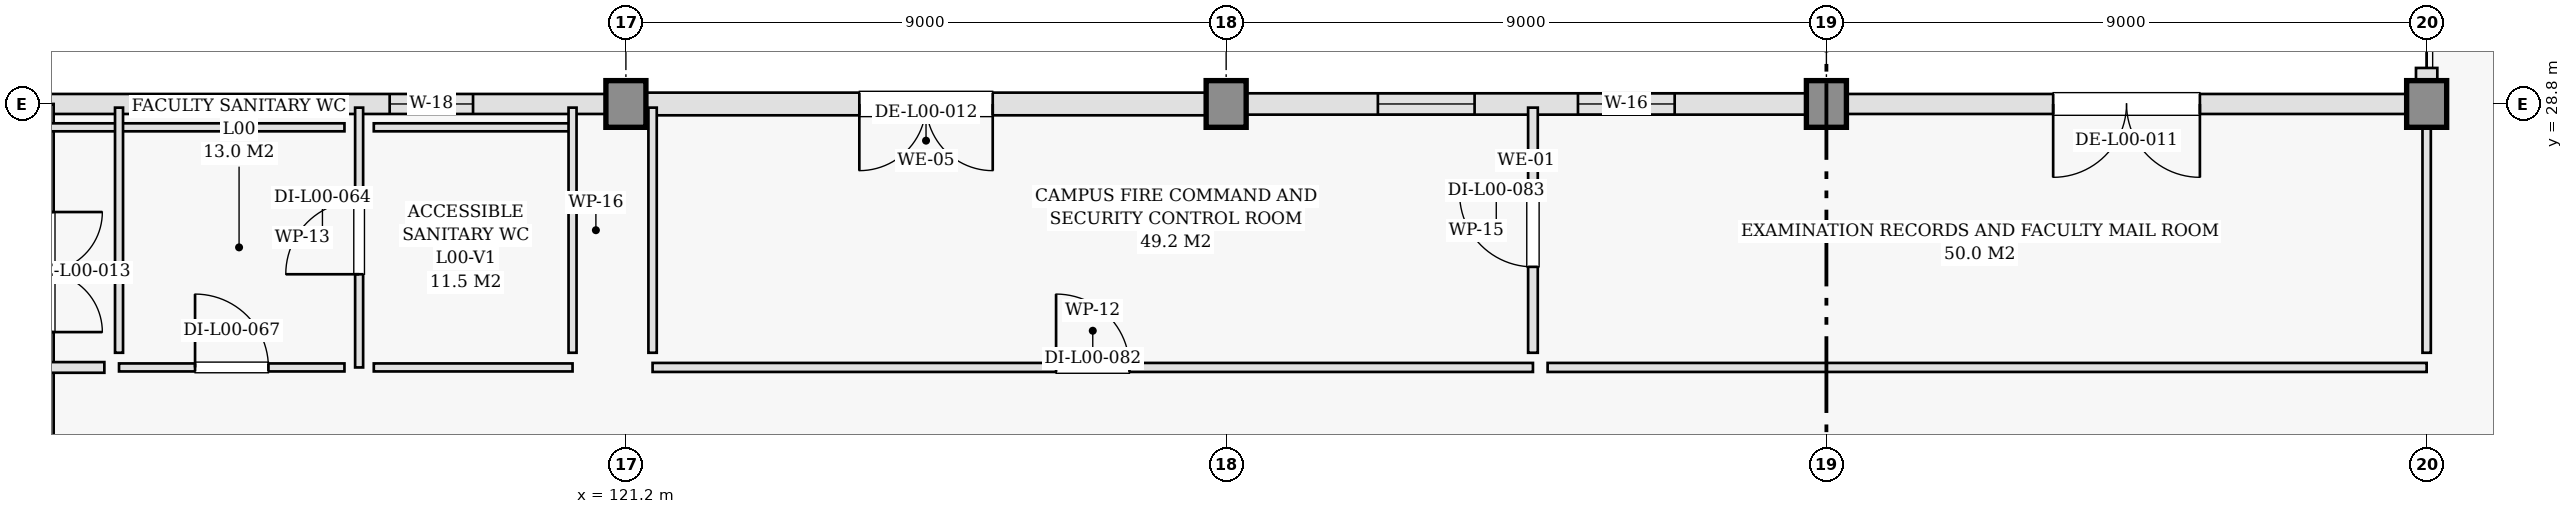
"""IFC4 building model, lengths in metres.
Left out: names, types, materials, properties, quantities, classifications, styles, units other than length and angle.
Written with IfcOpenShell. Run it as: python <this file> out.ifc"""

import sys

from ifc_helpers import new_model, si_unit, direction, frame, frame_2d, origin, origin_2d, place, context, subcontext, project, spatial, rectangle, extrude, element, fill, save


model = new_model("IFC4")
c1 = context("Model", 3, precision=1e-05, world=origin(), true_north=direction((0.0, 1.0)))
c2 = subcontext(c1, "Body", "Model", "MODEL_VIEW")
j1 = project(units=[si_unit("LENGTHUNIT", "METRE"), si_unit("PLANEANGLEUNIT", "RADIAN")], contexts=[c1])
p1 = place(None, origin())
s1 = spatial("IfcSite", under=j1, at=p1, CompositionType="ELEMENT")
p2 = place(p1, origin())
s2 = spatial("IfcBuilding", under=s1, at=p2, CompositionType="ELEMENT")
p3 = place(p2, origin())
s3 = spatial("IfcBuildingStorey", under=s2, at=p3, CompositionType="ELEMENT", Elevation=0.0)
for number, where, z_axis, x_axis in (
    (1, (121.2, 28.8, 0.0), (0.0, 0.0, 1.0), (1.0, 0.0, 0.0)),
    (2, (130.2, 28.8, 0.0), (0.0, 0.0, 1.0), (1.0, 0.0, 0.0)),
    (3, (139.2, 28.8, 0.0), (0.0, 0.0, 1.0), (1.0, 0.0, 0.0)),
    (4, (148.2, 28.8, 0.0), (0.0, 0.0, 1.0), (1.0, 0.0, 0.0)),
):
    element("IfcColumn", number, at=place(p3, frame(where, z_axis=z_axis, x_axis=x_axis)), inside=s3, PredefinedType="COLUMN", context=c2, shape_type="SweptSolid", body=[
        extrude(rectangle(XDim=0.7, YDim=0.7, at=origin_2d()), origin(), (0.0, 0.0, 1.0), 4.8),
    ])
p4 = place(p3, frame((148.2, 29.34, 0.0), z_axis=(0.0, 0.0, 1.0), x_axis=(0.0, -1.0, 0.0)))
e5 = element("IfcWall", 5, at=p4, inside=s3, PredefinedType="SOLIDWALL", context=c2, shape_type="SweptSolid", body=[
    extrude(rectangle(XDim=0.388, YDim=0.32, at=frame_2d((0.194, 0.0))), origin(), (0.0, 0.0, 1.0), 3.705),
])
p5 = place(p3, frame((148.2, 28.8, 0.0), z_axis=(0.0, 0.0, 1.0), x_axis=(-1.0, 0.0, 0.0)))
e6 = element("IfcWall", 6, at=p5, inside=s3, PredefinedType="SOLIDWALL", context=c2, shape_type="SweptSolid", body=[
    extrude(rectangle(XDim=9.0, YDim=0.3, at=frame_2d((4.5, 0.0))), origin(), (0.0, 0.0, 1.0), 3.705),
])
p6 = place(p5, frame((3.4, 0.0, 0.0)))
e7 = element("IfcOpeningElement", 7, at=p6, cuts=e6, PredefinedType="OPENING", context=c2, shape_type="SweptSolid", body=[
    extrude(rectangle(XDim=2.2, YDim=2.35, at=frame_2d((1.1, 1.175))), frame((0.0, 0.16, 0.0), z_axis=(0.0, -1.0, 0.0), x_axis=(1.0, 0.0, 0.0)), (0.0, 0.0, 1.0), 0.32),
])
p7 = place(p3, frame((139.2, 28.8, 0.0), z_axis=(0.0, 0.0, 1.0), x_axis=(-1.0, 0.0, 0.0)))
e8 = element("IfcWall", 8, at=p7, inside=s3, PredefinedType="SOLIDWALL", context=c2, shape_type="SweptSolid", body=[
    extrude(rectangle(XDim=9.0, YDim=0.32, at=frame_2d((4.5, 0.0))), origin(), (0.0, 0.0, 1.0), 3.705),
])
p8 = place(p7, frame((2.275, 0.0, 0.9)))
e9 = element("IfcOpeningElement", 9, at=p8, cuts=e8, PredefinedType="OPENING", context=c2, shape_type="SweptSolid", body=[
    extrude(rectangle(XDim=1.45, YDim=1.6, at=frame_2d((0.725, 0.8))), frame((0.0, 0.17, 0.0), z_axis=(0.0, -1.0, 0.0), x_axis=(1.0, 0.0, 0.0)), (0.0, 0.0, 1.0), 0.34),
])
p9 = place(p7, frame((5.275, 0.0, 0.9)))
e10 = element("IfcOpeningElement", 10, at=p9, cuts=e8, PredefinedType="OPENING", context=c2, shape_type="SweptSolid", body=[
    extrude(rectangle(XDim=1.45, YDim=1.6, at=frame_2d((0.725, 0.8))), frame((0.0, 0.17, 0.0), z_axis=(0.0, -1.0, 0.0), x_axis=(1.0, 0.0, 0.0)), (0.0, 0.0, 1.0), 0.34),
])
p10 = place(p3, frame((130.2, 28.8, 0.0), z_axis=(0.0, 0.0, 1.0), x_axis=(-1.0, 0.0, 0.0)))
e11 = element("IfcWall", 11, at=p10, inside=s3, PredefinedType="SOLIDWALL", context=c2, shape_type="SweptSolid", body=[
    extrude(rectangle(XDim=9.0, YDim=0.34, at=frame_2d((4.5, 0.0))), origin(), (0.0, 0.0, 1.0), 3.705),
])
p11 = place(p10, frame((3.5, 0.0, 0.0)))
e12 = element("IfcOpeningElement", 12, at=p11, cuts=e11, PredefinedType="OPENING", context=c2, shape_type="SweptSolid", body=[
    extrude(rectangle(XDim=2.0, YDim=2.3, at=frame_2d((1.0, 1.15))), frame((0.0, 0.18, 0.0), z_axis=(0.0, -1.0, 0.0), x_axis=(1.0, 0.0, 0.0)), (0.0, 0.0, 1.0), 0.36),
])
p12 = place(p3, frame((121.2, 28.8, 0.0), z_axis=(0.0, 0.0, 1.0), x_axis=(-1.0, 0.0, 0.0)))
e13 = element("IfcWall", 13, at=p12, inside=s3, PredefinedType="SOLIDWALL", context=c2, shape_type="SweptSolid", body=[
    extrude(rectangle(XDim=8.75, YDim=0.3, at=frame_2d((4.375, 0.0))), origin(), (0.0, 0.0, 1.0), 3.705),
])
p13 = place(p12, frame((2.292, 0.0, 0.9)))
e14 = element("IfcOpeningElement", 14, at=p13, cuts=e13, PredefinedType="OPENING", context=c2, shape_type="SweptSolid", body=[
    extrude(rectangle(XDim=1.25, YDim=1.5, at=frame_2d((0.625, 0.75))), frame((0.0, 0.16, 0.0), z_axis=(0.0, -1.0, 0.0), x_axis=(1.0, 0.0, 0.0)), (0.0, 0.0, 1.0), 0.32),
])
p14 = place(p12, frame((5.208, 0.0, 0.9)))
e15 = element("IfcOpeningElement", 15, at=p14, cuts=e13, PredefinedType="OPENING", context=c2, shape_type="SweptSolid", body=[
    extrude(rectangle(XDim=1.25, YDim=1.5, at=frame_2d((0.625, 0.75))), frame((0.0, 0.16, 0.0), z_axis=(0.0, -1.0, 0.0), x_axis=(1.0, 0.0, 0.0)), (0.0, 0.0, 1.0), 0.32),
])
p15 = place(p3, frame((112.45, 28.8, 0.0), z_axis=(0.0, 0.0, 1.0), x_axis=(0.0, -1.0, 0.0)))
e16 = element("IfcWall", 16, at=p15, inside=s3, PredefinedType="SOLIDWALL", context=c2, shape_type="SweptSolid", body=[
    extrude(rectangle(XDim=7.2, YDim=0.34, at=frame_2d((3.6, 0.0))), origin(), (0.0, 0.0, 1.0), 3.705),
])
p16 = place(p15, frame((1.62, 0.0, 0.0)))
e17 = element("IfcOpeningElement", 17, at=p16, cuts=e16, PredefinedType="OPENING", context=c2, shape_type="SweptSolid", body=[
    extrude(rectangle(XDim=1.8, YDim=2.2, at=frame_2d((0.9, 1.1))), frame((0.0, 0.18, 0.0), z_axis=(0.0, -1.0, 0.0), x_axis=(1.0, 0.0, 0.0)), (0.0, 0.0, 1.0), 0.36),
])
p17 = place(p3, frame((117.2, 24.85, 0.0), z_axis=(0.0, 0.0, 1.0), x_axis=(0.0, 1.0, 0.0)))
e18 = element("IfcWall", 18, at=p17, inside=s3, PredefinedType="PARTITIONING", context=c2, shape_type="SweptSolid", body=[
    extrude(rectangle(XDim=3.895, YDim=0.12, at=frame_2d((1.948, 0.0))), origin(), (0.0, 0.0, 1.0), 3.705),
])
p18 = place(p17, frame((1.397, 0.0, 0.0)))
e19 = element("IfcOpeningElement", 19, at=p18, cuts=e18, PredefinedType="OPENING", context=c2, shape_type="SweptSolid", body=[
    extrude(rectangle(XDim=1.1, YDim=2.15, at=frame_2d((0.55, 1.075))), frame((0.0, 0.07, 0.0), z_axis=(0.0, -1.0, 0.0), x_axis=(1.0, 0.0, 0.0)), (0.0, 0.0, 1.0), 0.14),
])
for number, where, z_axis, x_axis in (
    (20, (117.42, 24.85, 0.0), (0.0, 0.0, 1.0), (1.0, 0.0, 0.0)),
    (21, (117.42, 28.45, 0.0), (0.0, 0.0, 1.0), (1.0, 0.0, 0.0)),
):
    element("IfcWall", number, at=place(p3, frame(where, z_axis=z_axis, x_axis=x_axis)), inside=s3, PredefinedType="PARTITIONING", context=c2, shape_type="SweptSolid", body=[
        extrude(rectangle(XDim=2.98, YDim=0.12, at=frame_2d((1.49, 0.0))), origin(), (0.0, 0.0, 1.0), 4.52),
    ])
p19 = place(p3, frame((120.4, 25.07, 0.0), z_axis=(0.0, 0.0, 1.0), x_axis=(0.0, 1.0, 0.0)))
e22 = element("IfcWall", 22, at=p19, inside=s3, PredefinedType="PARTITIONING", context=c2, shape_type="SweptSolid", body=[
    extrude(rectangle(XDim=3.675, YDim=0.12, at=frame_2d((1.837, 0.0))), origin(), (0.0, 0.0, 1.0), 3.705),
])
p20 = place(p3, frame((112.505, 28.45, 0.0), z_axis=(0.0, 0.0, 1.0), x_axis=(1.0, 0.0, 0.0)))
e23 = element("IfcWall", 23, at=p20, inside=s3, PredefinedType="PARTITIONING", context=c2, shape_type="SweptSolid", body=[
    extrude(rectangle(XDim=4.475, YDim=0.12, at=frame_2d((2.238, 0.0))), origin(), (0.0, 0.0, 1.0), 4.52),
])
p21 = place(p3, frame((113.6, 24.85, 0.0), z_axis=(0.0, 0.0, 1.0), x_axis=(1.0, 0.0, 0.0)))
e24 = element("IfcWall", 24, at=p21, inside=s3, PredefinedType="PARTITIONING", context=c2, shape_type="SweptSolid", body=[
    extrude(rectangle(XDim=3.38, YDim=0.12, at=frame_2d((1.69, 0.0))), origin(), (0.0, 0.0, 1.0), 4.52),
])
p22 = place(p21, frame((1.14, 0.0, 0.0)))
e25 = element("IfcOpeningElement", 25, at=p22, cuts=e24, PredefinedType="OPENING", context=c2, shape_type="SweptSolid", body=[
    extrude(rectangle(XDim=1.1, YDim=2.15, at=frame_2d((0.55, 1.075))), frame((0.0, 0.07, 0.0), z_axis=(0.0, -1.0, 0.0), x_axis=(1.0, 0.0, 0.0)), (0.0, 0.0, 1.0), 0.14),
])
p23 = place(p3, frame((113.6, 25.07, 0.0), z_axis=(0.0, 0.0, 1.0), x_axis=(0.0, 1.0, 0.0)))
e26 = element("IfcWall", 26, at=p23, inside=s3, PredefinedType="PARTITIONING", context=c2, shape_type="SweptSolid", body=[
    extrude(rectangle(XDim=3.675, YDim=0.12, at=frame_2d((1.837, 0.0))), origin(), (0.0, 0.0, 1.0), 3.705),
])
p24 = place(p3, frame((121.6, 24.85, 0.0), z_axis=(0.0, 0.0, 1.0), x_axis=(1.0, 0.0, 0.0)))
e27 = element("IfcWall", 27, at=p24, inside=s3, PredefinedType="PARTITIONING", context=c2, shape_type="SweptSolid", body=[
    extrude(rectangle(XDim=13.2, YDim=0.135, at=frame_2d((6.6, 0.0))), origin(), (0.0, 0.0, 1.0), 4.52),
])
p25 = place(p24, frame((6.05, 0.0, 0.0)))
e28 = element("IfcOpeningElement", 28, at=p25, cuts=e27, PredefinedType="OPENING", context=c2, shape_type="SweptSolid", body=[
    extrude(rectangle(XDim=1.1, YDim=2.15, at=frame_2d((0.55, 1.075))), frame((0.0, 0.078, 0.0), z_axis=(0.0, -1.0, 0.0), x_axis=(1.0, 0.0, 0.0)), (0.0, 0.0, 1.0), 0.155),
])
p26 = place(p3, frame((121.6, 25.07, 0.0), z_axis=(0.0, 0.0, 1.0), x_axis=(0.0, 1.0, 0.0)))
e29 = element("IfcWall", 29, at=p26, inside=s3, PredefinedType="PARTITIONING", context=c2, shape_type="SweptSolid", body=[
    extrude(rectangle(XDim=3.675, YDim=0.125, at=frame_2d((1.837, 0.0))), origin(), (0.0, 0.0, 1.0), 3.705),
])
p27 = place(p3, frame((134.8, 25.07, 0.0), z_axis=(0.0, 0.0, 1.0), x_axis=(0.0, 1.0, 0.0)))
e30 = element("IfcWall", 30, at=p27, inside=s3, PredefinedType="PARTITIONING", context=c2, shape_type="SweptSolid", body=[
    extrude(rectangle(XDim=3.675, YDim=0.145, at=frame_2d((1.837, 0.0))), origin(), (0.0, 0.0, 1.0), 3.705),
])
p28 = place(p27, frame((1.288, 0.0, 0.0)))
e31 = element("IfcOpeningElement", 31, at=p28, cuts=e30, PredefinedType="OPENING", context=c2, shape_type="SweptSolid", body=[
    extrude(rectangle(XDim=1.1, YDim=2.15, at=frame_2d((0.55, 1.075))), frame((0.0, 0.083, 0.0), z_axis=(0.0, -1.0, 0.0), x_axis=(1.0, 0.0, 0.0)), (0.0, 0.0, 1.0), 0.165),
])
p29 = place(p3, frame((135.02, 24.85, 0.0), z_axis=(0.0, 0.0, 1.0), x_axis=(1.0, 0.0, 0.0)))
e32 = element("IfcWall", 32, at=p29, inside=s3, PredefinedType="PARTITIONING", context=c2, shape_type="SweptSolid", body=[
    extrude(rectangle(XDim=13.18, YDim=0.135, at=frame_2d((6.59, 0.0))), origin(), (0.0, 0.0, 1.0), 3.855),
])
p30 = place(p3, frame((148.2, 25.07, 0.0), z_axis=(0.0, 0.0, 1.0), x_axis=(0.0, 1.0, 0.0)))
e33 = element("IfcWall", 33, at=p30, inside=s3, PredefinedType="PARTITIONING", context=c2, shape_type="SweptSolid", body=[
    extrude(rectangle(XDim=3.49, YDim=0.125, at=frame_2d((1.745, 0.0))), origin(), (0.0, 0.0, 1.0), 3.855),
])
p31 = place(p3, frame((112.505, 24.85, 0.0), z_axis=(0.0, 0.0, 1.0), x_axis=(1.0, 0.0, 0.0)))
e34 = element("IfcWall", 34, at=p31, inside=s3, PredefinedType="PARTITIONING", context=c2, shape_type="SweptSolid", body=[
    extrude(rectangle(XDim=0.875, YDim=0.16, at=frame_2d((0.438, 0.0))), origin(), (0.0, 0.0, 1.0), 4.52),
])
p32 = place(p6, origin())
e35 = element("IfcDoor", 35, at=p32, inside=s3, OperationType="DOUBLE_DOOR_SINGLE_SWING", PredefinedType="DOOR", context=c2, shape_type="SweptSolid", body=[
    extrude(rectangle(XDim=2.2, YDim=2.35, at=frame_2d((1.1, 1.175))), frame((0.0, 0.025, 0.0), z_axis=(0.0, -1.0, 0.0), x_axis=(1.0, 0.0, 0.0)), (0.0, 0.0, 1.0), 0.05),
])
fill(e7, e35)
p33 = place(p8, origin())
e36 = element("IfcWindow", 36, at=p33, inside=s3, PartitioningType="DOUBLE_PANEL_VERTICAL", PredefinedType="WINDOW", context=c2, shape_type="SweptSolid", body=[
    extrude(rectangle(XDim=1.45, YDim=1.6, at=frame_2d((0.725, 0.8))), frame((0.0, 0.03, 0.0), z_axis=(0.0, -1.0, 0.0), x_axis=(1.0, 0.0, 0.0)), (0.0, 0.0, 1.0), 0.06),
])
fill(e9, e36)
p34 = place(p9, origin())
e37 = element("IfcWindow", 37, at=p34, inside=s3, PartitioningType="DOUBLE_PANEL_VERTICAL", PredefinedType="WINDOW", context=c2, shape_type="SweptSolid", body=[
    extrude(rectangle(XDim=1.45, YDim=1.6, at=frame_2d((0.725, 0.8))), frame((0.0, 0.03, 0.0), z_axis=(0.0, -1.0, 0.0), x_axis=(1.0, 0.0, 0.0)), (0.0, 0.0, 1.0), 0.06),
])
fill(e10, e37)
p35 = place(p11, origin())
e38 = element("IfcDoor", 38, at=p35, inside=s3, OperationType="DOUBLE_DOOR_SINGLE_SWING", PredefinedType="DOOR", context=c2, shape_type="SweptSolid", body=[
    extrude(rectangle(XDim=2.0, YDim=2.3, at=frame_2d((1.0, 1.15))), frame((0.0, 0.025, 0.0), z_axis=(0.0, -1.0, 0.0), x_axis=(1.0, 0.0, 0.0)), (0.0, 0.0, 1.0), 0.05),
])
fill(e12, e38)
p36 = place(p13, origin())
e39 = element("IfcWindow", 39, at=p36, inside=s3, PartitioningType="DOUBLE_PANEL_VERTICAL", PredefinedType="WINDOW", context=c2, shape_type="SweptSolid", body=[
    extrude(rectangle(XDim=1.25, YDim=1.5, at=frame_2d((0.625, 0.75))), frame((0.0, 0.03, 0.0), z_axis=(0.0, -1.0, 0.0), x_axis=(1.0, 0.0, 0.0)), (0.0, 0.0, 1.0), 0.06),
])
fill(e14, e39)
p37 = place(p14, origin())
e40 = element("IfcWindow", 40, at=p37, inside=s3, PartitioningType="DOUBLE_PANEL_VERTICAL", PredefinedType="WINDOW", context=c2, shape_type="SweptSolid", body=[
    extrude(rectangle(XDim=1.25, YDim=1.5, at=frame_2d((0.625, 0.75))), frame((0.0, 0.03, 0.0), z_axis=(0.0, -1.0, 0.0), x_axis=(1.0, 0.0, 0.0)), (0.0, 0.0, 1.0), 0.06),
])
fill(e15, e40)
p38 = place(p18, origin())
e41 = element("IfcDoor", 41, at=p38, inside=s3, OperationType="SINGLE_SWING_LEFT", PredefinedType="DOOR", context=c2, shape_type="SweptSolid", body=[
    extrude(rectangle(XDim=1.1, YDim=2.15, at=frame_2d((0.55, 1.075))), frame((0.0, 0.025, 0.0), z_axis=(0.0, -1.0, 0.0), x_axis=(1.0, 0.0, 0.0)), (0.0, 0.0, 1.0), 0.05),
])
fill(e19, e41)
p39 = place(p22, origin())
e42 = element("IfcDoor", 42, at=p39, inside=s3, OperationType="SINGLE_SWING_LEFT", PredefinedType="DOOR", context=c2, shape_type="SweptSolid", body=[
    extrude(rectangle(XDim=1.1, YDim=2.15, at=frame_2d((0.55, 1.075))), frame((0.0, 0.025, 0.0), z_axis=(0.0, -1.0, 0.0), x_axis=(1.0, 0.0, 0.0)), (0.0, 0.0, 1.0), 0.05),
])
fill(e25, e42)
p40 = place(p25, origin())
e43 = element("IfcDoor", 43, at=p40, inside=s3, OperationType="SINGLE_SWING_LEFT", PredefinedType="DOOR", context=c2, shape_type="SweptSolid", body=[
    extrude(rectangle(XDim=1.1, YDim=2.15, at=frame_2d((0.55, 1.075))), frame((0.0, 0.025, 0.0), z_axis=(0.0, -1.0, 0.0), x_axis=(1.0, 0.0, 0.0)), (0.0, 0.0, 1.0), 0.05),
])
fill(e28, e43)
p41 = place(p28, origin())
e44 = element("IfcDoor", 44, at=p41, inside=s3, OperationType="SINGLE_SWING_RIGHT", PredefinedType="DOOR", context=c2, shape_type="SweptSolid", body=[
    extrude(rectangle(XDim=1.1, YDim=2.15, at=frame_2d((0.55, 1.075))), frame((0.0, 0.025, 0.0), z_axis=(0.0, -1.0, 0.0), x_axis=(1.0, 0.0, 0.0)), (0.0, 0.0, 1.0), 0.05),
])
fill(e31, e44)
save(model, sys.argv[1])
